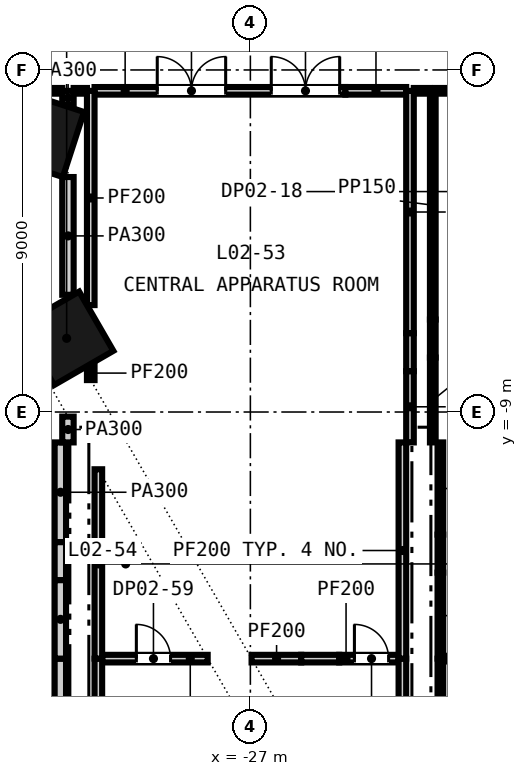
"""IFC4 building model, lengths in metres.
Left out: names, types, materials, properties, quantities, classifications, styles, units other than length and angle.
Written with IfcOpenShell. Run it as: python <this file> out.ifc"""

import sys

from ifc_helpers import new_model, si_unit, direction, frame, frame_2d, origin, origin_2d, place, context, subcontext, project, spatial, rectangle, extrude, element, fill, save


model = new_model("IFC4")
c1 = context("Model", 3, precision=1e-05, world=origin(), true_north=direction((0.0, 1.0)))
c2 = subcontext(c1, "Body", "Model", "MODEL_VIEW")
j1 = project(units=[si_unit("LENGTHUNIT", "METRE"), si_unit("PLANEANGLEUNIT", "RADIAN")], contexts=[c1])
p1 = place(None, origin())
s1 = spatial("IfcSite", under=j1, at=p1, CompositionType="ELEMENT")
p2 = place(p1, origin())
s2 = spatial("IfcBuilding", under=s1, at=p2, CompositionType="ELEMENT")
p3 = place(p2, frame((0.0, 0.0, 18.0)))
s3 = spatial("IfcBuildingStorey", under=s2, at=p3, CompositionType="ELEMENT", Elevation=18.0)
for number, where, z_axis, x_axis in (
    (1, (-32.512, -1.683, -0.4), (0.0, 0.0, 1.0), (-0.309, -0.951, 0.0)),
    (2, (-31.834, -7.061, -0.4), (0.0, 0.0, 1.0), (0.5, -0.866, 0.0)),
):
    element("IfcColumn", number, at=place(p3, frame(where, z_axis=z_axis, x_axis=x_axis)), inside=s3, PredefinedType="COLUMN", context=c2, shape_type="SweptSolid", body=[
        extrude(rectangle(XDim=1.8, YDim=1.8, at=origin_2d()), origin(), (0.0, 0.0, 1.0), 4.6),
    ])
p4 = place(p3, frame((-35.781, -15.489, 0.0), z_axis=(0.0, 0.0, 1.0), x_axis=(1.0, 0.0, 0.0)))
e3 = element("IfcWall", 3, at=p4, inside=s3, PredefinedType="PARTITIONING", context=c2, shape_type="SweptSolid", body=[
    extrude(rectangle(XDim=3.631, YDim=0.3, at=frame_2d((1.815, 0.0))), origin(), (0.0, 0.0, 1.0), 4.2),
])
p5 = place(p3, frame((-30.9, -15.489, 0.0), z_axis=(0.0, 0.0, 1.0), x_axis=(1.0, 0.0, 0.0)))
e4 = element("IfcWall", 4, at=p5, inside=s3, PredefinedType="PARTITIONING", context=c2, shape_type="SweptSolid", body=[
    extrude(rectangle(XDim=2.777, YDim=0.2, at=frame_2d((1.388, 0.0))), origin(), (0.0, 0.0, 1.0), 4.2),
])
p6 = place(p5, frame((0.9, 0.0, 0.0)))
e5 = element("IfcOpeningElement", 5, at=p6, cuts=e4, PredefinedType="OPENING", context=c2, shape_type="SweptSolid", body=[
    extrude(rectangle(XDim=0.9, YDim=2.1, at=frame_2d((0.45, 1.05))), frame((0.0, 0.11, 0.0), z_axis=(0.0, -1.0, 0.0), x_axis=(1.0, 0.0, 0.0)), (0.0, 0.0, 1.0), 0.22),
])
p7 = place(p3, frame((-26.968, -15.489, 0.0), z_axis=(0.0, 0.0, 1.0), x_axis=(1.0, 0.0, 0.0)))
e6 = element("IfcWall", 6, at=p7, inside=s3, PredefinedType="PARTITIONING", context=c2, shape_type="SweptSolid", body=[
    extrude(rectangle(XDim=1.306, YDim=0.2, at=frame_2d((0.653, 0.0))), origin(), (0.0, 0.0, 1.0), 4.2),
])
p8 = place(p3, frame((-25.662, -15.489, 0.0), z_axis=(0.0, 0.0, 1.0), x_axis=(1.0, 0.0, 0.0)))
e7 = element("IfcWall", 7, at=p8, inside=s3, PredefinedType="PARTITIONING", context=c2, shape_type="SweptSolid", body=[
    extrude(rectangle(XDim=1.0, YDim=0.2, at=frame_2d((0.5, 0.0))), origin(), (0.0, 0.0, 1.0), 3.597),
])
p9 = place(p3, frame((-24.662, -15.489, 0.0), z_axis=(0.0, 0.0, 1.0), x_axis=(1.0, 0.0, 0.0)))
e8 = element("IfcWall", 8, at=p9, inside=s3, PredefinedType="PARTITIONING", context=c2, shape_type="SweptSolid", body=[
    extrude(rectangle(XDim=1.562, YDim=0.2, at=frame_2d((0.781, 0.0))), origin(), (0.0, 0.0, 1.0), 3.111),
])
p10 = place(p9, frame((0.4, 0.0, 0.0)))
e9 = element("IfcOpeningElement", 9, at=p10, cuts=e8, PredefinedType="OPENING", context=c2, shape_type="SweptSolid", body=[
    extrude(rectangle(XDim=0.9, YDim=2.1, at=frame_2d((0.45, 1.05))), frame((0.0, 0.11, 0.0), z_axis=(0.0, -1.0, 0.0), x_axis=(1.0, 0.0, 0.0)), (0.0, 0.0, 1.0), 0.22),
])
p11 = place(p3, frame((-21.925, -15.489, 0.0), z_axis=(0.0, 0.0, 1.0), x_axis=(1.0, 0.0, 0.0)))
e10 = element("IfcWall", 10, at=p11, inside=s3, PredefinedType="PARTITIONING", context=c2, shape_type="SweptSolid", body=[
    extrude(rectangle(XDim=7.85, YDim=0.15, at=frame_2d((3.925, 0.0))), origin(), (0.0, 0.0, 1.0), 4.2),
])
p12 = place(p3, frame((-32.859, -0.549, 0.0), z_axis=(0.0, 0.0, 1.0), x_axis=(1.0, 0.0, 0.0)))
e11 = element("IfcWall", 11, at=p12, inside=s3, PredefinedType="PARTITIONING", context=c2, shape_type="SweptSolid", body=[
    extrude(rectangle(XDim=0.909, YDim=0.15, at=frame_2d((0.455, 0.0))), origin(), (0.0, 0.0, 1.0), 3.2),
])
p13 = place(p3, frame((-31.65, -0.549, 0.0), z_axis=(0.0, 0.0, 1.0), x_axis=(1.0, 0.0, 0.0)))
e12 = element("IfcWall", 12, at=p13, inside=s3, PredefinedType="PARTITIONING", context=c2, shape_type="SweptSolid", body=[
    extrude(rectangle(XDim=0.35, YDim=0.15, at=frame_2d((0.175, 0.0))), origin(), (0.0, 0.0, 1.0), 4.2),
])
p14 = place(p3, frame((-31.1, -0.549, 0.0), z_axis=(0.0, 0.0, 1.0), x_axis=(1.0, 0.0, 0.0)))
e13 = element("IfcWall", 13, at=p14, inside=s3, PredefinedType="PARTITIONING", context=c2, shape_type="SweptSolid", body=[
    extrude(rectangle(XDim=6.6, YDim=0.2, at=frame_2d((3.3, 0.0))), origin(), (0.0, 0.0, 1.0), 4.2),
])
p15 = place(p14, frame((1.65, 0.0, 0.0)))
e14 = element("IfcOpeningElement", 14, at=p15, cuts=e13, PredefinedType="OPENING", context=c2, shape_type="SweptSolid", body=[
    extrude(rectangle(XDim=1.8, YDim=2.4, at=frame_2d((0.9, 1.2))), frame((0.0, 0.11, 0.0), z_axis=(0.0, -1.0, 0.0), x_axis=(1.0, 0.0, 0.0)), (0.0, 0.0, 1.0), 0.22),
])
p16 = place(p14, frame((4.65, 0.0, 0.0)))
e15 = element("IfcOpeningElement", 15, at=p16, cuts=e13, PredefinedType="OPENING", context=c2, shape_type="SweptSolid", body=[
    extrude(rectangle(XDim=1.8, YDim=2.4, at=frame_2d((0.9, 1.2))), frame((0.0, 0.11, 0.0), z_axis=(0.0, -1.0, 0.0), x_axis=(1.0, 0.0, 0.0)), (0.0, 0.0, 1.0), 0.22),
])
p17 = place(p3, frame((-24.5, -0.549, 0.0), z_axis=(0.0, 0.0, 1.0), x_axis=(1.0, 0.0, 0.0)))
e16 = element("IfcWall", 16, at=p17, inside=s3, PredefinedType="PARTITIONING", context=c2, shape_type="SweptSolid", body=[
    extrude(rectangle(XDim=1.6, YDim=0.2, at=frame_2d((0.8, 0.0))), origin(), (0.0, 0.0, 1.0), 3.111),
])
p18 = place(p3, frame((-22.7, -0.549, 0.0), z_axis=(0.0, 0.0, 1.0), x_axis=(1.0, 0.0, 0.0)))
e17 = element("IfcWall", 17, at=p18, inside=s3, PredefinedType="PARTITIONING", context=c2, shape_type="SweptSolid", body=[
    extrude(rectangle(XDim=0.425, YDim=0.15, at=frame_2d((0.212, 0.0))), origin(), (0.0, 0.0, 1.0), 4.2),
])
p19 = place(p3, frame((-22.125, -0.549, 0.0), z_axis=(0.0, 0.0, 1.0), x_axis=(1.0, 0.0, 0.0)))
e18 = element("IfcWall", 18, at=p19, inside=s3, PredefinedType="PARTITIONING", context=c2, shape_type="SweptSolid", body=[
    extrude(rectangle(XDim=4.05, YDim=0.15, at=frame_2d((2.025, 0.0))), origin(), (0.0, 0.0, 1.0), 4.2),
])
p20 = place(p19, frame((1.4, 0.0, 0.0)))
e19 = element("IfcOpeningElement", 19, at=p20, cuts=e18, PredefinedType="OPENING", context=c2, shape_type="SweptSolid", body=[
    extrude(rectangle(XDim=1.0, YDim=2.1, at=frame_2d((0.5, 1.05))), frame((0.0, 0.085, 0.0), z_axis=(0.0, -1.0, 0.0), x_axis=(1.0, 0.0, 0.0)), (0.0, 0.0, 1.0), 0.17),
])
p21 = place(p3, frame((-32.0, -20.963, 0.0), z_axis=(0.0, 0.0, 1.0), x_axis=(0.0, 1.0, 0.0)))
e20 = element("IfcWall", 20, at=p21, inside=s3, PredefinedType="PARTITIONING", context=c2, shape_type="SweptSolid", body=[
    extrude(rectangle(XDim=5.472, YDim=0.3, at=frame_2d((2.736, 0.0))), origin(), (0.0, 0.0, 1.0), 4.2),
])
p22 = place(p3, frame((-32.0, -15.489, 0.0), z_axis=(0.0, 0.0, 1.0), x_axis=(0.0, 1.0, 0.0)))
e21 = element("IfcWall", 21, at=p22, inside=s3, PredefinedType="PARTITIONING", context=c2, shape_type="SweptSolid", body=[
    extrude(rectangle(XDim=2.066, YDim=0.3, at=frame_2d((1.033, 0.0))), origin(), (0.0, 0.0, 1.0), 4.2),
])
p23 = place(p3, frame((-32.0, -13.422, 0.0), z_axis=(0.0, 0.0, 1.0), x_axis=(0.0, 1.0, 0.0)))
e22 = element("IfcWall", 22, at=p23, inside=s3, PredefinedType="PARTITIONING", context=c2, shape_type="SweptSolid", body=[
    extrude(rectangle(XDim=1.0, YDim=0.3, at=frame_2d((0.5, 0.0))), origin(), (0.0, 0.0, 1.0), 3.597),
])
p24 = place(p3, frame((-32.0, -12.422, 0.0), z_axis=(0.0, 0.0, 1.0), x_axis=(0.0, 1.0, 0.0)))
e23 = element("IfcWall", 23, at=p24, inside=s3, PredefinedType="PARTITIONING", context=c2, shape_type="SweptSolid", body=[
    extrude(rectangle(XDim=2.622, YDim=0.3, at=frame_2d((1.311, 0.0))), origin(), (0.0, 0.0, 1.0), 4.2),
])
p25 = place(p3, frame((-31.8, -9.8, 0.0), z_axis=(0.0, 0.0, 1.0), x_axis=(0.0, 1.0, 0.0)))
e24 = element("IfcWall", 24, at=p25, inside=s3, PredefinedType="PARTITIONING", context=c2, shape_type="SweptSolid", body=[
    extrude(rectangle(XDim=0.679, YDim=0.3, at=frame_2d((0.34, 0.0))), origin(), (0.0, 0.0, 1.0), 4.2),
])
p26 = place(p3, frame((-31.8, -5.916, 0.0), z_axis=(0.0, 0.0, 1.0), x_axis=(0.0, 1.0, 0.0)))
e25 = element("IfcWall", 25, at=p26, inside=s3, PredefinedType="PARTITIONING", context=c2, shape_type="SweptSolid", body=[
    extrude(rectangle(XDim=3.099, YDim=0.3, at=frame_2d((1.549, 0.0))), origin(), (0.0, 0.0, 1.0), 4.2),
])
p27 = place(p3, frame((-31.8, -0.919, 0.0), z_axis=(0.0, 0.0, 1.0), x_axis=(0.0, 1.0, 0.0)))
e26 = element("IfcWall", 26, at=p27, inside=s3, PredefinedType="PARTITIONING", context=c2, shape_type="SweptSolid", body=[
    extrude(rectangle(XDim=0.369, YDim=0.3, at=frame_2d((0.185, 0.0))), origin(), (0.0, 0.0, 1.0), 4.2),
])
p28 = place(p3, frame((-31.2, -8.16, 0.0), z_axis=(0.0, 0.0, 1.0), x_axis=(0.0, 1.0, 0.0)))
e27 = element("IfcWall", 27, at=p28, inside=s3, PredefinedType="PARTITIONING", context=c2, shape_type="SweptSolid", body=[
    extrude(rectangle(XDim=0.368, YDim=0.2, at=frame_2d((0.184, 0.0))), origin(), (0.0, 0.0, 1.0), 4.2),
])
p29 = place(p3, frame((-31.2, -6.187, 0.0), z_axis=(0.0, 0.0, 1.0), x_axis=(0.0, 1.0, 0.0)))
e28 = element("IfcWall", 28, at=p29, inside=s3, PredefinedType="PARTITIONING", context=c2, shape_type="SweptSolid", body=[
    extrude(rectangle(XDim=5.637, YDim=0.2, at=frame_2d((2.818, 0.0))), origin(), (0.0, 0.0, 1.0), 4.2),
])
p30 = place(p3, frame((-31.0, -20.089, 0.0), z_axis=(0.0, 0.0, 1.0), x_axis=(0.0, 1.0, 0.0)))
e29 = element("IfcWall", 29, at=p30, inside=s3, PredefinedType="PARTITIONING", context=c2, shape_type="SweptSolid", body=[
    extrude(rectangle(XDim=4.599, YDim=0.2, at=frame_2d((2.299, 0.0))), origin(), (0.0, 0.0, 1.0), 4.2),
])
p31 = place(p3, frame((-31.0, -15.489, 0.0), z_axis=(0.0, 0.0, 1.0), x_axis=(0.0, 1.0, 0.0)))
e30 = element("IfcWall", 30, at=p31, inside=s3, PredefinedType="PARTITIONING", context=c2, shape_type="SweptSolid", body=[
    extrude(rectangle(XDim=4.982, YDim=0.2, at=frame_2d((2.491, 0.0))), origin(), (0.0, 0.0, 1.0), 4.2),
])
p32 = place(p3, frame((-23.0, -21.336, 0.0), z_axis=(0.0, 0.0, 1.0), x_axis=(0.0, 1.0, 0.0)))
e31 = element("IfcWall", 31, at=p32, inside=s3, PredefinedType="PARTITIONING", context=c2, shape_type="SweptSolid", body=[
    extrude(rectangle(XDim=5.846, YDim=0.2, at=frame_2d((2.923, 0.0))), origin(), (0.0, 0.0, 1.0), 4.2),
])
p33 = place(p3, frame((-23.0, -15.489, 0.0), z_axis=(0.0, 0.0, 1.0), x_axis=(0.0, 1.0, 0.0)))
e32 = element("IfcWall", 32, at=p33, inside=s3, PredefinedType="PARTITIONING", context=c2, shape_type="SweptSolid", body=[
    extrude(rectangle(XDim=5.688, YDim=0.2, at=frame_2d((2.844, 0.0))), origin(), (0.0, 0.0, 1.0), 4.2),
])
p34 = place(p3, frame((-22.8, -9.8, 0.0), z_axis=(0.0, 0.0, 1.0), x_axis=(0.0, 1.0, 0.0)))
e33 = element("IfcWall", 33, at=p34, inside=s3, PredefinedType="PARTITIONING", context=c2, shape_type="SweptSolid", body=[
    extrude(rectangle(XDim=1.875, YDim=0.2, at=frame_2d((0.938, 0.0))), origin(), (0.0, 0.0, 1.0), 4.2),
])
p35 = place(p3, frame((-22.8, -7.925, 0.0), z_axis=(0.0, 0.0, 1.0), x_axis=(0.0, 1.0, 0.0)))
e34 = element("IfcWall", 34, at=p35, inside=s3, PredefinedType="PARTITIONING", context=c2, shape_type="SweptSolid", body=[
    extrude(rectangle(XDim=1.0, YDim=0.2, at=frame_2d((0.5, 0.0))), origin(), (0.0, 0.0, 1.0), 3.365),
])
p36 = place(p3, frame((-22.8, -6.925, 0.0), z_axis=(0.0, 0.0, 1.0), x_axis=(0.0, 1.0, 0.0)))
e35 = element("IfcWall", 35, at=p36, inside=s3, PredefinedType="PARTITIONING", context=c2, shape_type="SweptSolid", body=[
    extrude(rectangle(XDim=6.375, YDim=0.2, at=frame_2d((3.188, 0.0))), origin(), (0.0, 0.0, 1.0), 4.2),
])
p37 = place(p3, frame((-22.2, -9.8, 0.0), z_axis=(0.0, 0.0, 1.0), x_axis=(0.0, 1.0, 0.0)))
e36 = element("IfcWall", 36, at=p37, inside=s3, PredefinedType="PARTITIONING", context=c2, shape_type="SweptSolid", body=[
    extrude(rectangle(XDim=2.233, YDim=0.15, at=frame_2d((1.117, 0.0))), origin(), (0.0, 0.0, 1.0), 4.2),
])
p38 = place(p3, frame((-22.2, -7.567, 0.0), z_axis=(0.0, 0.0, 1.0), x_axis=(0.0, 1.0, 0.0)))
e37 = element("IfcWall", 37, at=p38, inside=s3, PredefinedType="PARTITIONING", context=c2, shape_type="SweptSolid", body=[
    extrude(rectangle(XDim=1.0, YDim=0.15, at=frame_2d((0.5, 0.0))), origin(), (0.0, 0.0, 1.0), 3.365),
])
p39 = place(p3, frame((-22.2, -6.567, 0.0), z_axis=(0.0, 0.0, 1.0), x_axis=(0.0, 1.0, 0.0)))
e38 = element("IfcWall", 38, at=p39, inside=s3, PredefinedType="PARTITIONING", context=c2, shape_type="SweptSolid", body=[
    extrude(rectangle(XDim=6.017, YDim=0.15, at=frame_2d((3.009, 0.0))), origin(), (0.0, 0.0, 1.0), 4.2),
])
p40 = place(p3, frame((-22.0, -20.183, 0.0), z_axis=(0.0, 0.0, 1.0), x_axis=(0.0, 1.0, 0.0)))
e39 = element("IfcWall", 39, at=p40, inside=s3, PredefinedType="PARTITIONING", context=c2, shape_type="SweptSolid", body=[
    extrude(rectangle(XDim=4.692, YDim=0.15, at=frame_2d((2.346, 0.0))), origin(), (0.0, 0.0, 1.0), 4.2),
])
p41 = place(p3, frame((-22.0, -15.489, 0.0), z_axis=(0.0, 0.0, 1.0), x_axis=(0.0, 1.0, 0.0)))
e40 = element("IfcWall", 40, at=p41, inside=s3, PredefinedType="PARTITIONING", context=c2, shape_type="SweptSolid", body=[
    extrude(rectangle(XDim=2.262, YDim=0.15, at=frame_2d((1.131, 0.0))), origin(), (0.0, 0.0, 1.0), 4.2),
])
p42 = place(p3, frame((-22.0, -13.226, 0.0), z_axis=(0.0, 0.0, 1.0), x_axis=(0.0, 1.0, 0.0)))
e41 = element("IfcWall", 41, at=p42, inside=s3, PredefinedType="PARTITIONING", context=c2, shape_type="SweptSolid", body=[
    extrude(rectangle(XDim=1.0, YDim=0.15, at=frame_2d((0.5, 0.0))), origin(), (0.0, 0.0, 1.0), 3.298),
])
p43 = place(p3, frame((-22.0, -12.226, 0.0), z_axis=(0.0, 0.0, 1.0), x_axis=(0.0, 1.0, 0.0)))
e42 = element("IfcWall", 42, at=p43, inside=s3, PredefinedType="PARTITIONING", context=c2, shape_type="SweptSolid", body=[
    extrude(rectangle(XDim=2.426, YDim=0.15, at=frame_2d((1.213, 0.0))), origin(), (0.0, 0.0, 1.0), 4.2),
])
p44 = place(p15, origin())
e43 = element("IfcDoor", 43, at=p44, inside=s3, OperationType="SINGLE_SWING_LEFT", PredefinedType="DOOR", context=c2, shape_type="SweptSolid", body=[
    extrude(rectangle(XDim=1.8, YDim=2.4, at=frame_2d((0.9, 1.2))), frame((0.0, 0.025, 0.0), z_axis=(0.0, -1.0, 0.0), x_axis=(1.0, 0.0, 0.0)), (0.0, 0.0, 1.0), 0.05),
])
fill(e14, e43)
p45 = place(p16, origin())
e44 = element("IfcDoor", 44, at=p45, inside=s3, OperationType="SINGLE_SWING_LEFT", PredefinedType="DOOR", context=c2, shape_type="SweptSolid", body=[
    extrude(rectangle(XDim=1.8, YDim=2.4, at=frame_2d((0.9, 1.2))), frame((0.0, 0.025, 0.0), z_axis=(0.0, -1.0, 0.0), x_axis=(1.0, 0.0, 0.0)), (0.0, 0.0, 1.0), 0.05),
])
fill(e15, e44)
p46 = place(p6, origin())
e45 = element("IfcDoor", 45, at=p46, inside=s3, OperationType="SINGLE_SWING_LEFT", PredefinedType="DOOR", context=c2, shape_type="SweptSolid", body=[
    extrude(rectangle(XDim=0.9, YDim=2.1, at=frame_2d((0.45, 1.05))), frame((0.0, 0.025, 0.0), z_axis=(0.0, -1.0, 0.0), x_axis=(1.0, 0.0, 0.0)), (0.0, 0.0, 1.0), 0.05),
])
fill(e5, e45)
p47 = place(p10, origin())
e46 = element("IfcDoor", 46, at=p47, inside=s3, OperationType="SINGLE_SWING_LEFT", PredefinedType="DOOR", context=c2, shape_type="SweptSolid", body=[
    extrude(rectangle(XDim=0.9, YDim=2.1, at=frame_2d((0.45, 1.05))), frame((0.0, 0.025, 0.0), z_axis=(0.0, -1.0, 0.0), x_axis=(1.0, 0.0, 0.0)), (0.0, 0.0, 1.0), 0.05),
])
fill(e9, e46)
save(model, sys.argv[1])
